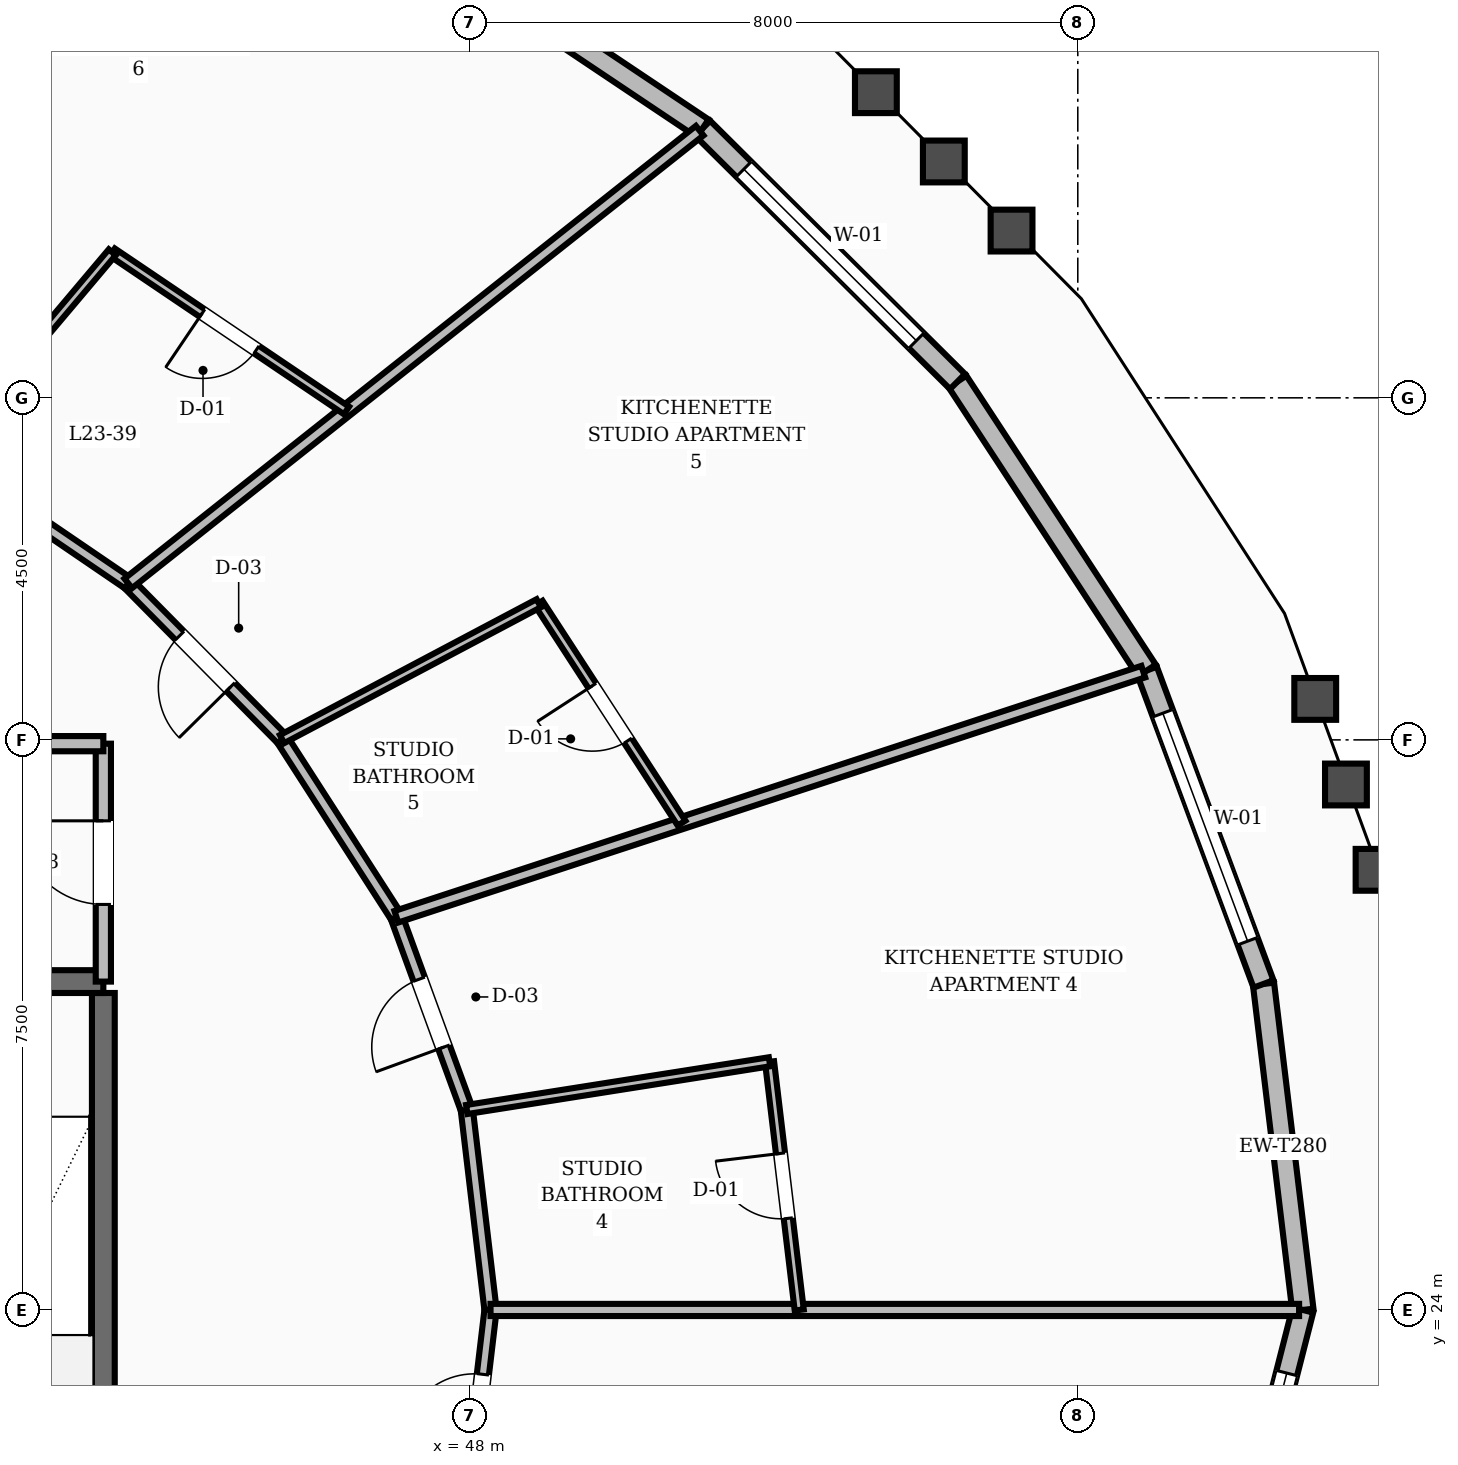
"""IFC4 building model, lengths in metres.
Left out: names, types, materials, properties, quantities, classifications, styles, units other than length and angle.
Written with IfcOpenShell. Run it as: python <this file> out.ifc"""

import sys

from ifc_helpers import new_model, si_unit, direction, frame, frame_2d, origin, place, context, subcontext, project, spatial, rectangle, extrude, element, fill, save


model = new_model("IFC4")
c1 = context("Model", 3, precision=1e-05, world=origin(), true_north=direction((0.0, 1.0)))
c2 = subcontext(c1, "Body", "Model", "MODEL_VIEW")
j1 = project(units=[si_unit("LENGTHUNIT", "METRE"), si_unit("PLANEANGLEUNIT", "RADIAN")], contexts=[c1])
p1 = place(None, origin())
s1 = spatial("IfcSite", under=j1, at=p1, CompositionType="ELEMENT")
p2 = place(p1, origin())
s2 = spatial("IfcBuilding", under=s1, at=p2, CompositionType="ELEMENT")
p3 = place(p2, frame((0.0, 0.0, 91.6)))
s3 = spatial("IfcBuildingStorey", under=s2, at=p3, CompositionType="ELEMENT", Elevation=91.6)
p4 = place(p3, frame((43.18, 19.43, 0.0), z_axis=(0.0, 0.0, 1.0), x_axis=(0.0, 1.0, 0.0)))
e1 = element("IfcWall", 1, at=p4, inside=s3, PredefinedType="SHEAR", context=c2, shape_type="SweptSolid", body=[
    extrude(rectangle(XDim=8.74, YDim=0.3, at=frame_2d((4.37, 0.0))), origin(), (0.0, 0.0, 1.0), 3.6),
])
p5 = place(p3, frame((39.58, 28.32, 0.0), z_axis=(0.0, 0.0, 1.0), x_axis=(1.0, 0.0, 0.0)))
e2 = element("IfcWall", 2, at=p5, inside=s3, PredefinedType="SHEAR", context=c2, shape_type="SweptSolid", body=[
    extrude(rectangle(XDim=3.6, YDim=0.3, at=frame_2d((1.8, 0.0))), origin(), (0.0, 0.0, 1.0), 3.6),
])
p6 = place(p5, frame((1.3, 0.0, 0.0)))
e3 = element("IfcOpeningElement", 3, at=p6, cuts=e2, PredefinedType="OPENING", context=c2, shape_type="SweptSolid", body=[
    extrude(rectangle(XDim=1.1, YDim=2.1, at=frame_2d((0.55, 1.05))), frame((0.0, 0.16, 0.0), z_axis=(0.0, -1.0, 0.0), x_axis=(1.0, 0.0, 0.0)), (0.0, 0.0, 1.0), 0.32),
])
p7 = place(p3, frame((58.961, 24.0, 0.0), z_axis=(0.0, 0.0, 1.0), x_axis=(-0.11991619344, 0.992784018078, 0.0)))
e4 = element("IfcWall", 4, at=p7, inside=s3, PredefinedType="STANDARD", context=c2, shape_type="SweptSolid", body=[
    extrude(rectangle(XDim=4.32, YDim=0.28, at=frame_2d((2.16, 0.0))), origin(), (0.0, 0.0, 1.0), 2.71),
])
p8 = place(p3, frame((58.443, 28.289, 0.0), z_axis=(0.0, 0.0, 1.0), x_axis=(-0.348647575397, 0.937253897388, 0.0)))
e5 = element("IfcWall", 5, at=p8, inside=s3, PredefinedType="STANDARD", context=c2, shape_type="SweptSolid", body=[
    extrude(rectangle(XDim=4.4, YDim=0.28, at=frame_2d((2.2, 0.0))), origin(), (0.0, 0.0, 1.0), 2.71),
])
p9 = place(p8, frame((0.6, 0.0, 0.8)))
e6 = element("IfcOpeningElement", 6, at=p9, cuts=e5, PredefinedType="OPENING", context=c2, shape_type="SweptSolid", body=[
    extrude(rectangle(XDim=3.2, YDim=1.65, at=frame_2d((1.6, 0.825))), frame((0.0, 0.15, 0.0), z_axis=(0.0, -1.0, 0.0), x_axis=(1.0, 0.0, 0.0)), (0.0, 0.0, 1.0), 0.3),
])
p10 = place(p3, frame((56.909, 32.413, 0.0), z_axis=(0.0, 0.0, 1.0), x_axis=(-0.548224545432, 0.836331183076, 0.0)))
e7 = element("IfcWall", 7, at=p10, inside=s3, PredefinedType="STANDARD", context=c2, shape_type="SweptSolid", body=[
    extrude(rectangle(XDim=4.545, YDim=0.28, at=frame_2d((2.272, 0.0))), origin(), (0.0, 0.0, 1.0), 2.71),
])
p11 = place(p3, frame((54.418, 36.214, 0.0), z_axis=(0.0, 0.0, 1.0), x_axis=(-0.709375776042, 0.704830482006, 0.0)))
e8 = element("IfcWall", 8, at=p11, inside=s3, PredefinedType="STANDARD", context=c2, shape_type="SweptSolid", body=[
    extrude(rectangle(XDim=4.727, YDim=0.28, at=frame_2d((2.363, 0.0))), origin(), (0.0, 0.0, 1.0), 2.71),
])
p12 = place(p11, frame((0.763, 0.0, 0.8)))
e9 = element("IfcOpeningElement", 9, at=p12, cuts=e8, PredefinedType="OPENING", context=c2, shape_type="SweptSolid", body=[
    extrude(rectangle(XDim=3.2, YDim=1.65, at=frame_2d((1.6, 0.825))), frame((0.0, 0.15, 0.0), z_axis=(0.0, -1.0, 0.0), x_axis=(1.0, 0.0, 0.0)), (0.0, 0.0, 1.0), 0.3),
])
p13 = place(p3, frame((51.065, 39.546, 0.0), z_axis=(0.0, 0.0, 1.0), x_axis=(-0.831078719633, 0.556154800189, 0.0)))
e10 = element("IfcWall", 10, at=p13, inside=s3, PredefinedType="STANDARD", context=c2, shape_type="SweptSolid", body=[
    extrude(rectangle(XDim=4.916, YDim=0.28, at=frame_2d((2.458, 0.0))), origin(), (0.0, 0.0, 1.0), 2.71),
])
p14 = place(p3, frame((57.871, 19.731, 0.0), z_axis=(0.0, 0.0, 1.0), x_axis=(0.247421985174, 0.968907818759, 0.0)))
e11 = element("IfcWall", 11, at=p14, inside=s3, PredefinedType="STANDARD", context=c2, shape_type="SweptSolid", body=[
    extrude(rectangle(XDim=4.406, YDim=0.28, at=frame_2d((2.203, 0.0))), origin(), (0.0, 0.0, 1.0), 2.71),
])
p15 = place(p14, frame((0.949, 0.0, 0.8)))
e12 = element("IfcOpeningElement", 12, at=p15, cuts=e11, PredefinedType="OPENING", context=c2, shape_type="SweptSolid", body=[
    extrude(rectangle(XDim=2.6, YDim=1.65, at=frame_2d((1.3, 0.825))), frame((0.0, 0.15, 0.0), z_axis=(0.0, -1.0, 0.0), x_axis=(1.0, 0.0, 0.0)), (0.0, 0.0, 1.0), 0.3),
])
p16 = place(p3, frame((43.18, 28.32, 0.0), z_axis=(0.0, 0.0, 1.0), x_axis=(0.0, 1.0, 0.0)))
e13 = element("IfcWall", 13, at=p16, inside=s3, PredefinedType="SOLIDWALL", context=c2, shape_type="SweptSolid", body=[
    extrude(rectangle(XDim=3.13, YDim=0.2, at=frame_2d((1.565, 0.0))), origin(), (0.0, 0.0, 1.0), 2.71),
])
p17 = place(p16, frame((1.015, 0.0, 0.0)))
e14 = element("IfcOpeningElement", 14, at=p17, cuts=e13, PredefinedType="OPENING", context=c2, shape_type="SweptSolid", body=[
    extrude(rectangle(XDim=1.1, YDim=2.1, at=frame_2d((0.55, 1.05))), frame((0.0, 0.11, 0.0), z_axis=(0.0, -1.0, 0.0), x_axis=(1.0, 0.0, 0.0)), (0.0, 0.0, 1.0), 0.22),
])
p18 = place(p3, frame((39.2, 31.45, 0.0), z_axis=(0.0, 0.0, 1.0), x_axis=(1.0, 0.0, 0.0)))
e15 = element("IfcWall", 15, at=p18, inside=s3, PredefinedType="SOLIDWALL", context=c2, shape_type="SweptSolid", body=[
    extrude(rectangle(XDim=3.98, YDim=0.2, at=frame_2d((1.99, 0.0))), origin(), (0.0, 0.0, 1.0), 2.71),
])
p19 = place(p3, frame((48.274, 24.0, 0.0), z_axis=(0.0, 0.0, 1.0), x_axis=(-0.117763961213, 0.99304161516, 0.0)))
e16 = element("IfcWall", 16, at=p19, inside=s3, PredefinedType="SOLIDWALL", context=c2, shape_type="SweptSolid", body=[
    extrude(rectangle(XDim=2.656, YDim=0.16, at=frame_2d((1.328, 0.0))), origin(), (0.0, 0.0, 1.0), 2.71),
])
p20 = place(p3, frame((47.961, 26.637, 0.0), z_axis=(0.0, 0.0, 1.0), x_axis=(-0.343013437329, 0.939330496583, 0.0)))
e17 = element("IfcWall", 17, at=p20, inside=s3, PredefinedType="SOLIDWALL", context=c2, shape_type="SweptSolid", body=[
    extrude(rectangle(XDim=2.7, YDim=0.16, at=frame_2d((1.35, 0.0))), origin(), (0.0, 0.0, 1.0), 2.71),
])
p21 = place(p20, frame((0.875, 0.0, 0.0)))
e18 = element("IfcOpeningElement", 18, at=p21, cuts=e17, PredefinedType="OPENING", context=c2, shape_type="SweptSolid", body=[
    extrude(rectangle(XDim=0.95, YDim=2.1, at=frame_2d((0.475, 1.05))), frame((0.0, 0.09, 0.0), z_axis=(0.0, -1.0, 0.0), x_axis=(1.0, 0.0, 0.0)), (0.0, 0.0, 1.0), 0.18),
])
p22 = place(p3, frame((47.035, 29.173, 0.0), z_axis=(0.0, 0.0, 1.0), x_axis=(-0.541126045017, 0.840941498206, 0.0)))
e19 = element("IfcWall", 19, at=p22, inside=s3, PredefinedType="SOLIDWALL", context=c2, shape_type="SweptSolid", body=[
    extrude(rectangle(XDim=2.779, YDim=0.16, at=frame_2d((1.39, 0.0))), origin(), (0.0, 0.0, 1.0), 2.71),
])
p23 = place(p3, frame((45.531, 31.51, 0.0), z_axis=(0.0, 0.0, 1.0), x_axis=(-0.702811997, 0.711375636969, 0.0)))
e20 = element("IfcWall", 20, at=p23, inside=s3, PredefinedType="SOLIDWALL", context=c2, shape_type="SweptSolid", body=[
    extrude(rectangle(XDim=2.879, YDim=0.16, at=frame_2d((1.44, 0.0))), origin(), (0.0, 0.0, 1.0), 2.71),
])
p24 = place(p23, frame((0.965, 0.0, 0.0)))
e21 = element("IfcOpeningElement", 21, at=p24, cuts=e20, PredefinedType="OPENING", context=c2, shape_type="SweptSolid", body=[
    extrude(rectangle(XDim=0.95, YDim=2.1, at=frame_2d((0.475, 1.05))), frame((0.0, 0.09, 0.0), z_axis=(0.0, -1.0, 0.0), x_axis=(1.0, 0.0, 0.0)), (0.0, 0.0, 1.0), 0.18),
])
p25 = place(p3, frame((43.508, 33.559, 0.0), z_axis=(0.0, 0.0, 1.0), x_axis=(-0.826293096206, 0.56324037423, 0.0)))
e22 = element("IfcWall", 22, at=p25, inside=s3, PredefinedType="SOLIDWALL", context=c2, shape_type="SweptSolid", body=[
    extrude(rectangle(XDim=2.985, YDim=0.16, at=frame_2d((1.492, 0.0))), origin(), (0.0, 0.0, 1.0), 2.71),
])
p26 = place(p3, frame((47.961, 21.363, 0.0), z_axis=(0.0, 0.0, 1.0), x_axis=(0.117763961213, 0.99304161516, 0.0)))
e23 = element("IfcWall", 23, at=p26, inside=s3, PredefinedType="SOLIDWALL", context=c2, shape_type="SweptSolid", body=[
    extrude(rectangle(XDim=2.656, YDim=0.16, at=frame_2d((1.328, 0.0))), origin(), (0.0, 0.0, 1.0), 2.71),
])
p27 = place(p26, frame((0.853, 0.0, 0.0)))
e24 = element("IfcOpeningElement", 24, at=p27, cuts=e23, PredefinedType="OPENING", context=c2, shape_type="SweptSolid", body=[
    extrude(rectangle(XDim=0.95, YDim=2.1, at=frame_2d((0.475, 1.05))), frame((0.0, 0.09, 0.0), z_axis=(0.0, -1.0, 0.0), x_axis=(1.0, 0.0, 0.0)), (0.0, 0.0, 1.0), 0.18),
])
p28 = place(p3, frame((48.274, 24.0, 0.0), z_axis=(0.0, 0.0, 1.0), x_axis=(1.0, 0.0, 0.0)))
e25 = element("IfcWall", 25, at=p28, inside=s3, PredefinedType="SOLIDWALL", context=c2, shape_type="SweptSolid", body=[
    extrude(rectangle(XDim=10.638, YDim=0.16, at=frame_2d((5.319, 0.0))), origin(), (0.0, 0.0, 1.0), 2.71),
])
p29 = place(p3, frame((52.335, 24.0, 0.0), z_axis=(0.0, 0.0, 1.0), x_axis=(-0.118796809784, 0.992918585779, 0.0)))
e26 = element("IfcWall", 26, at=p29, inside=s3, PredefinedType="PARTITIONING", context=c2, shape_type="SweptSolid", body=[
    extrude(rectangle(XDim=3.288, YDim=0.12, at=frame_2d((1.644, 0.0))), origin(), (0.0, 0.0, 1.0), 2.71),
])
p30 = place(p29, frame((1.214, 0.0, 0.0)))
e27 = element("IfcOpeningElement", 27, at=p30, cuts=e26, PredefinedType="OPENING", context=c2, shape_type="SweptSolid", body=[
    extrude(rectangle(XDim=0.86, YDim=2.1, at=frame_2d((0.43, 1.05))), frame((0.0, 0.07, 0.0), z_axis=(0.0, -1.0, 0.0), x_axis=(1.0, 0.0, 0.0)), (0.0, 0.0, 1.0), 0.14),
])
p31 = place(p3, frame((47.961, 26.637, 0.0), z_axis=(0.0, 0.0, 1.0), x_axis=(0.987811515009, 0.155654780895, 0.0)))
e28 = element("IfcWall", 28, at=p31, inside=s3, PredefinedType="PARTITIONING", context=c2, shape_type="SweptSolid", body=[
    extrude(rectangle(XDim=4.032, YDim=0.12, at=frame_2d((2.016, 0.0))), origin(), (0.0, 0.0, 1.0), 2.71),
])
p32 = place(p3, frame((47.035, 29.173, 0.0), z_axis=(0.0, 0.0, 1.0), x_axis=(0.950150689475, 0.311791063518, 0.0)))
e29 = element("IfcWall", 29, at=p32, inside=s3, PredefinedType="SOLIDWALL", context=c2, shape_type="SweptSolid", body=[
    extrude(rectangle(XDim=10.342, YDim=0.16, at=frame_2d((5.171, 0.0))), origin(), (0.0, 0.0, 1.0), 2.71),
])
p33 = place(p3, frame((50.787, 30.404, 0.0), z_axis=(0.0, 0.0, 1.0), x_axis=(-0.544682368389, 0.838642425332, 0.0)))
e30 = element("IfcWall", 30, at=p33, inside=s3, PredefinedType="PARTITIONING", context=c2, shape_type="SweptSolid", body=[
    extrude(rectangle(XDim=3.45, YDim=0.12, at=frame_2d((1.725, 0.0))), origin(), (0.0, 0.0, 1.0), 2.71),
])
p34 = place(p33, frame((1.295, 0.0, 0.0)))
e31 = element("IfcOpeningElement", 31, at=p34, cuts=e30, PredefinedType="OPENING", context=c2, shape_type="SweptSolid", body=[
    extrude(rectangle(XDim=0.86, YDim=2.1, at=frame_2d((0.43, 1.05))), frame((0.0, 0.07, 0.0), z_axis=(0.0, -1.0, 0.0), x_axis=(1.0, 0.0, 0.0)), (0.0, 0.0, 1.0), 0.14),
])
p35 = place(p3, frame((45.531, 31.51, 0.0), z_axis=(0.0, 0.0, 1.0), x_axis=(0.88383609415, 0.46779670657, 0.0)))
e32 = element("IfcWall", 32, at=p35, inside=s3, PredefinedType="PARTITIONING", context=c2, shape_type="SweptSolid", body=[
    extrude(rectangle(XDim=3.821, YDim=0.12, at=frame_2d((1.91, 0.0))), origin(), (0.0, 0.0, 1.0), 2.71),
])
p36 = place(p3, frame((43.508, 33.559, 0.0), z_axis=(0.0, 0.0, 1.0), x_axis=(0.783820213827, 0.620987819846, 0.0)))
e33 = element("IfcWall", 33, at=p36, inside=s3, PredefinedType="SOLIDWALL", context=c2, shape_type="SweptSolid", body=[
    extrude(rectangle(XDim=9.591, YDim=0.16, at=frame_2d((4.796, 0.0))), origin(), (0.0, 0.0, 1.0), 2.71),
])
p37 = place(p3, frame((46.379, 35.834, 0.0), z_axis=(0.0, 0.0, 1.0), x_axis=(-0.828691848629, 0.559705118805, 0.0)))
e34 = element("IfcWall", 34, at=p37, inside=s3, PredefinedType="PARTITIONING", context=c2, shape_type="SweptSolid", body=[
    extrude(rectangle(XDim=3.719, YDim=0.12, at=frame_2d((1.859, 0.0))), origin(), (0.0, 0.0, 1.0), 2.71),
])
p38 = place(p37, frame((1.429, 0.0, 0.0)))
e35 = element("IfcOpeningElement", 35, at=p38, cuts=e34, PredefinedType="OPENING", context=c2, shape_type="SweptSolid", body=[
    extrude(rectangle(XDim=0.86, YDim=2.1, at=frame_2d((0.43, 1.05))), frame((0.0, 0.07, 0.0), z_axis=(0.0, -1.0, 0.0), x_axis=(1.0, 0.0, 0.0)), (0.0, 0.0, 1.0), 0.14),
])
p39 = place(p3, frame((41.041, 35.24, 0.0), z_axis=(0.0, 0.0, 1.0), x_axis=(0.644715569152, 0.764422549964, 0.0)))
e36 = element("IfcWall", 36, at=p39, inside=s3, PredefinedType="PARTITIONING", context=c2, shape_type="SweptSolid", body=[
    extrude(rectangle(XDim=3.5, YDim=0.12, at=frame_2d((1.75, 0.0))), origin(), (0.0, 0.0, 1.0), 2.71),
])
p40 = place(p9, origin())
e37 = element("IfcWindow", 37, at=p40, inside=s3, PartitioningType="SINGLE_PANEL", PredefinedType="WINDOW", context=c2, shape_type="SweptSolid", body=[
    extrude(rectangle(XDim=3.2, YDim=1.65, at=frame_2d((1.6, 0.825))), frame((0.0, 0.03, 0.0), z_axis=(0.0, -1.0, 0.0), x_axis=(1.0, 0.0, 0.0)), (0.0, 0.0, 1.0), 0.06),
])
fill(e6, e37)
p41 = place(p12, origin())
e38 = element("IfcWindow", 38, at=p41, inside=s3, PartitioningType="SINGLE_PANEL", PredefinedType="WINDOW", context=c2, shape_type="SweptSolid", body=[
    extrude(rectangle(XDim=3.2, YDim=1.65, at=frame_2d((1.6, 0.825))), frame((0.0, 0.03, 0.0), z_axis=(0.0, -1.0, 0.0), x_axis=(1.0, 0.0, 0.0)), (0.0, 0.0, 1.0), 0.06),
])
fill(e9, e38)
p42 = place(p15, origin())
e39 = element("IfcWindow", 39, at=p42, inside=s3, PartitioningType="SINGLE_PANEL", PredefinedType="WINDOW", context=c2, shape_type="SweptSolid", body=[
    extrude(rectangle(XDim=2.6, YDim=1.65, at=frame_2d((1.3, 0.825))), frame((0.0, 0.03, 0.0), z_axis=(0.0, -1.0, 0.0), x_axis=(1.0, 0.0, 0.0)), (0.0, 0.0, 1.0), 0.06),
])
fill(e12, e39)
p43 = place(p17, origin())
e40 = element("IfcDoor", 40, at=p43, inside=s3, OperationType="SINGLE_SWING_RIGHT", PredefinedType="DOOR", context=c2, shape_type="SweptSolid", body=[
    extrude(rectangle(XDim=1.1, YDim=2.1, at=frame_2d((0.55, 1.05))), frame((0.0, 0.025, 0.0), z_axis=(0.0, -1.0, 0.0), x_axis=(1.0, 0.0, 0.0)), (0.0, 0.0, 1.0), 0.05),
])
fill(e14, e40)
p44 = place(p27, origin())
e41 = element("IfcDoor", 41, at=p44, inside=s3, OperationType="SINGLE_SWING_LEFT", PredefinedType="DOOR", context=c2, shape_type="SweptSolid", body=[
    extrude(rectangle(XDim=0.95, YDim=2.1, at=frame_2d((0.475, 1.05))), frame((0.0, 0.025, 0.0), z_axis=(0.0, -1.0, 0.0), x_axis=(1.0, 0.0, 0.0)), (0.0, 0.0, 1.0), 0.05),
])
fill(e24, e41)
p45 = place(p30, origin())
e42 = element("IfcDoor", 42, at=p45, inside=s3, OperationType="SINGLE_SWING_RIGHT", PredefinedType="DOOR", context=c2, shape_type="SweptSolid", body=[
    extrude(rectangle(XDim=0.86, YDim=2.1, at=frame_2d((0.43, 1.05))), frame((0.0, 0.025, 0.0), z_axis=(0.0, -1.0, 0.0), x_axis=(1.0, 0.0, 0.0)), (0.0, 0.0, 1.0), 0.05),
])
fill(e27, e42)
p46 = place(p21, origin())
e43 = element("IfcDoor", 43, at=p46, inside=s3, OperationType="SINGLE_SWING_LEFT", PredefinedType="DOOR", context=c2, shape_type="SweptSolid", body=[
    extrude(rectangle(XDim=0.95, YDim=2.1, at=frame_2d((0.475, 1.05))), frame((0.0, 0.025, 0.0), z_axis=(0.0, -1.0, 0.0), x_axis=(1.0, 0.0, 0.0)), (0.0, 0.0, 1.0), 0.05),
])
fill(e18, e43)
p47 = place(p34, origin())
e44 = element("IfcDoor", 44, at=p47, inside=s3, OperationType="SINGLE_SWING_RIGHT", PredefinedType="DOOR", context=c2, shape_type="SweptSolid", body=[
    extrude(rectangle(XDim=0.86, YDim=2.1, at=frame_2d((0.43, 1.05))), frame((0.0, 0.025, 0.0), z_axis=(0.0, -1.0, 0.0), x_axis=(1.0, 0.0, 0.0)), (0.0, 0.0, 1.0), 0.05),
])
fill(e31, e44)
p48 = place(p24, origin())
e45 = element("IfcDoor", 45, at=p48, inside=s3, OperationType="SINGLE_SWING_LEFT", PredefinedType="DOOR", context=c2, shape_type="SweptSolid", body=[
    extrude(rectangle(XDim=0.95, YDim=2.1, at=frame_2d((0.475, 1.05))), frame((0.0, 0.025, 0.0), z_axis=(0.0, -1.0, 0.0), x_axis=(1.0, 0.0, 0.0)), (0.0, 0.0, 1.0), 0.05),
])
fill(e21, e45)
p49 = place(p38, origin())
e46 = element("IfcDoor", 46, at=p49, inside=s3, OperationType="SINGLE_SWING_RIGHT", PredefinedType="DOOR", context=c2, shape_type="SweptSolid", body=[
    extrude(rectangle(XDim=0.86, YDim=2.1, at=frame_2d((0.43, 1.05))), frame((0.0, 0.025, 0.0), z_axis=(0.0, -1.0, 0.0), x_axis=(1.0, 0.0, 0.0)), (0.0, 0.0, 1.0), 0.05),
])
fill(e35, e46)
save(model, sys.argv[1])
